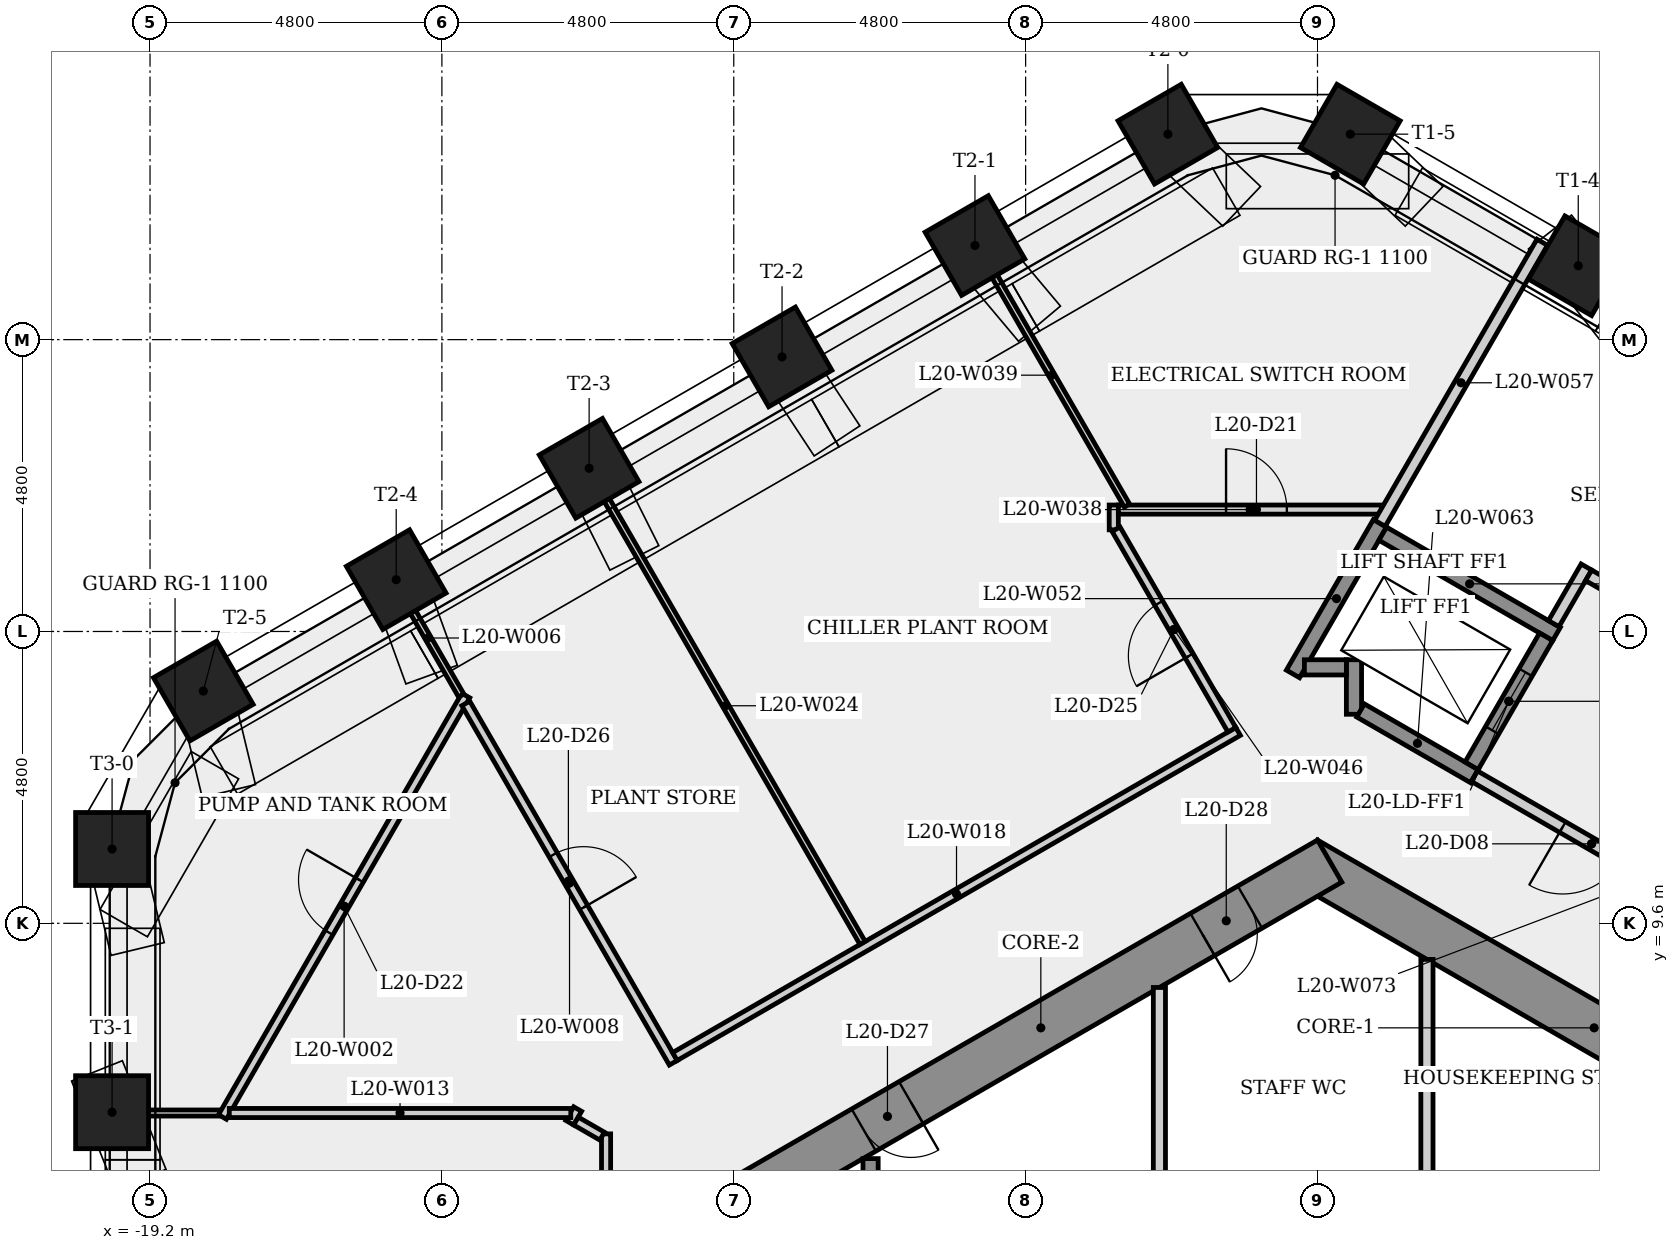
"""IFC4 building model, lengths in metres.
Left out: names, types, materials, properties, quantities, classifications, styles, units other than length and angle.
Written with IfcOpenShell. Run it as: python <this file> out.ifc"""

import sys

from ifc_helpers import new_model, si_unit, direction, frame, frame_2d, origin, origin_2d, place, context, subcontext, project, spatial, rectangle, extrude, element, fill, save


model = new_model("IFC4")
c1 = context("Model", 3, precision=1e-05, world=origin(), true_north=direction((0.0, 1.0)))
c2 = subcontext(c1, "Body", "Model", "MODEL_VIEW")
j1 = project(units=[si_unit("LENGTHUNIT", "METRE"), si_unit("PLANEANGLEUNIT", "RADIAN")], contexts=[c1])
p1 = place(None, origin())
s1 = spatial("IfcSite", under=j1, at=p1, CompositionType="ELEMENT")
p2 = place(p1, origin())
s2 = spatial("IfcBuilding", under=s1, at=p2, CompositionType="ELEMENT")
p3 = place(p2, frame((0.0, 0.0, 78.3)))
s3 = spatial("IfcBuildingStorey", under=s2, at=p3, CompositionType="ELEMENT", Elevation=78.3)
p4 = place(p3, frame((9.3, 5.138, 0.0), z_axis=(0.0, 0.0, 1.0), x_axis=(-0.866023993627, 0.500002442456, 0.0)))
e1 = element("IfcWall", 1, at=p4, inside=s3, PredefinedType="SHEAR", context=c2, shape_type="SweptSolid", body=[
    extrude(rectangle(XDim=10.97, YDim=0.8, at=frame_2d((5.485, 0.0))), origin(), (0.0, 0.0, 1.0), 4.8),
])
p5 = place(p4, frame((2.384, 0.0, 0.0)))
e2 = element("IfcOpeningElement", 2, at=p5, cuts=e1, PredefinedType="OPENING", context=c2, shape_type="SweptSolid", body=[
    extrude(rectangle(XDim=0.9, YDim=2.1, at=frame_2d((0.45, 1.05))), frame((0.0, 0.41, 0.0), z_axis=(0.0, -1.0, 0.0), x_axis=(1.0, 0.0, 0.0)), (0.0, 0.0, 1.0), 0.82),
])
p6 = place(p3, frame((0.2, 10.623, 0.0), z_axis=(0.0, 0.0, 1.0), x_axis=(-0.866023993627, -0.500002442456, 0.0)))
e3 = element("IfcWall", 3, at=p6, inside=s3, PredefinedType="SHEAR", context=c2, shape_type="SweptSolid", body=[
    extrude(rectangle(XDim=10.97, YDim=0.8, at=frame_2d((5.485, 0.0))), origin(), (0.0, 0.0, 1.0), 4.8),
])
p7 = place(p6, frame((7.947, 0.0, 0.0)))
e4 = element("IfcOpeningElement", 4, at=p7, cuts=e3, PredefinedType="OPENING", context=c2, shape_type="SweptSolid", body=[
    extrude(rectangle(XDim=0.9, YDim=2.1, at=frame_2d((0.45, 1.05))), frame((0.0, 0.41, 0.0), z_axis=(0.0, -1.0, 0.0), x_axis=(1.0, 0.0, 0.0)), (0.0, 0.0, 1.0), 0.82),
])
p8 = place(p6, frame((1.514, 0.0, 0.0)))
e5 = element("IfcOpeningElement", 5, at=p8, cuts=e3, PredefinedType="OPENING", context=c2, shape_type="SweptSolid", body=[
    extrude(rectangle(XDim=0.9, YDim=2.1, at=frame_2d((0.45, 1.05))), frame((0.0, 0.41, 0.0), z_axis=(0.0, -1.0, 0.0), x_axis=(1.0, 0.0, 0.0)), (0.0, 0.0, 1.0), 0.82),
])
for number, where, z_axis, x_axis in (
    (6, (4.289, 20.415, 0.0), (0.0, 0.0, 1.0), (0.5, 0.866, 0.0)),
    (7, (0.54, 22.579, 0.0), (0.0, 0.0, 1.0), (0.5, 0.866, 0.0)),
    (8, (-2.46, 22.579, 0.0), (0.0, 0.0, 1.0), (-0.5, 0.866, 0.0)),
    (9, (-5.633, 20.748, 0.0), (0.0, 0.0, 1.0), (-0.5, 0.866, 0.0)),
    (10, (-8.806, 18.916, 0.0), (0.0, 0.0, 1.0), (-0.5, 0.866, 0.0)),
    (11, (-11.979, 17.084, 0.0), (0.0, 0.0, 1.0), (-0.5, 0.866, 0.0)),
    (12, (-15.151, 15.252, 0.0), (0.0, 0.0, 1.0), (-0.5, 0.866, 0.0)),
    (13, (-18.324, 13.421, 0.0), (0.0, 0.0, 1.0), (-0.5, 0.866, 0.0)),
    (14, (-19.824, 10.823, 0.0), (0.0, 0.0, 1.0), (-1.0, 0.0, 0.0)),
    (15, (-19.824, 6.493, 0.0), (0.0, 0.0, 1.0), (-1.0, 0.0, 0.0)),
):
    element("IfcColumn", number, at=place(p3, frame(where, z_axis=z_axis, x_axis=x_axis)), inside=s3, PredefinedType="COLUMN", context=c2, shape_type="SweptSolid", body=[
        extrude(rectangle(XDim=1.2, YDim=1.2, at=origin_2d()), origin(), (0.0, 0.0, 1.0), 4.45),
    ])
p9 = place(p3, frame((-19.863, 6.48, 0.0), z_axis=(0.0, 0.0, 1.0), x_axis=(1.0, 0.0, 0.0)))
e16 = element("IfcWall", 16, at=p9, inside=s3, PredefinedType="PARTITIONING", context=c2, shape_type="SweptSolid", body=[
    extrude(rectangle(XDim=1.817, YDim=0.1, at=frame_2d((0.908, 0.0))), origin(), (0.0, 0.0, 1.0), 4.45),
])
p10 = place(p3, frame((-18.009, 6.415, 0.0), z_axis=(0.0, 0.0, 1.0), x_axis=(0.500010260686, 0.866019479694, 0.0)))
e17 = element("IfcWall", 17, at=p10, inside=s3, PredefinedType="PARTITIONING", context=c2, shape_type="SweptSolid", body=[
    extrude(rectangle(XDim=8.004, YDim=0.15, at=frame_2d((4.002, 0.0))), origin(), (0.0, 0.0, 1.0), 4.45),
])
p11 = place(p10, frame((3.502, 0.0, 0.0)))
e18 = element("IfcOpeningElement", 18, at=p11, cuts=e17, PredefinedType="OPENING", context=c2, shape_type="SweptSolid", body=[
    extrude(rectangle(XDim=1.0, YDim=2.1, at=frame_2d((0.5, 1.05))), frame((0.0, 0.085, 0.0), z_axis=(0.0, -1.0, 0.0), x_axis=(1.0, 0.0, 0.0)), (0.0, 0.0, 1.0), 0.17),
])
p12 = place(p3, frame((-15.175, 15.239, 0.0), z_axis=(0.0, 0.0, 1.0), x_axis=(0.500031897912, -0.866006986733, 0.0)))
e19 = element("IfcWall", 19, at=p12, inside=s3, PredefinedType="PARTITIONING", context=c2, shape_type="SweptSolid", body=[
    extrude(rectangle(XDim=2.185, YDim=0.1, at=frame_2d((1.093, 0.0))), origin(), (0.0, 0.0, 1.0), 2.425),
])
p13 = place(p3, frame((-14.007, 13.217, 0.0), z_axis=(0.0, 0.0, 1.0), x_axis=(0.499986710104, -0.866033076574, 0.0)))
e20 = element("IfcWall", 20, at=p13, inside=s3, PredefinedType="PARTITIONING", context=c2, shape_type="SweptSolid", body=[
    extrude(rectangle(XDim=6.824, YDim=0.15, at=frame_2d((3.412, 0.0))), origin(), (0.0, 0.0, 1.0), 4.45),
])
p14 = place(p13, frame((2.875, 0.0, 0.0)))
e21 = element("IfcOpeningElement", 21, at=p14, cuts=e20, PredefinedType="OPENING", context=c2, shape_type="SweptSolid", body=[
    extrude(rectangle(XDim=1.0, YDim=2.1, at=frame_2d((0.5, 1.05))), frame((0.0, 0.085, 0.0), z_axis=(0.0, -1.0, 0.0), x_axis=(1.0, 0.0, 0.0)), (0.0, 0.0, 1.0), 0.17),
])
p15 = place(p3, frame((-12.297, 6.32, 0.0), z_axis=(0.0, 0.0, 1.0), x_axis=(0.499885440202, 0.866091534813, 0.0)))
e22 = element("IfcWall", 22, at=p15, inside=s3, PredefinedType="PARTITIONING", context=c2, shape_type="SweptSolid", body=[
    extrude(rectangle(XDim=0.259, YDim=0.15, at=frame_2d((0.13, 0.0))), origin(), (0.0, 0.0, 1.0), 4.45),
])
p16 = place(p3, frame((-12.28, 6.48, 0.0), z_axis=(0.0, 0.0, 1.0), x_axis=(-1.0, 0.0, 0.0)))
e23 = element("IfcWall", 23, at=p16, inside=s3, PredefinedType="PARTITIONING", context=c2, shape_type="SweptSolid", body=[
    extrude(rectangle(XDim=5.616, YDim=0.15, at=frame_2d((2.808, 0.0))), origin(), (0.0, 0.0, 1.0), 4.45),
])
p17 = place(p3, frame((-11.7, -5.987, 0.0), z_axis=(0.0, 0.0, 1.0), x_axis=(0.0, 1.0, 0.0)))
e24 = element("IfcWall", 24, at=p17, inside=s3, PredefinedType="PARTITIONING", context=c2, shape_type="SweptSolid", body=[
    extrude(rectangle(XDim=12.125, YDim=0.15, at=frame_2d((6.062, 0.0))), origin(), (0.0, 0.0, 1.0), 4.45),
])
p18 = place(p17, frame((5.225, 0.0, 0.0)))
e25 = element("IfcOpeningElement", 25, at=p18, cuts=e24, PredefinedType="OPENING", context=c2, shape_type="SweptSolid", body=[
    extrude(rectangle(XDim=1.6, YDim=2.1, at=frame_2d((0.8, 1.05))), frame((0.0, 0.085, 0.0), z_axis=(0.0, -1.0, 0.0), x_axis=(1.0, 0.0, 0.0)), (0.0, 0.0, 1.0), 0.17),
])
p19 = place(p3, frame((-11.765, 6.1, 0.0), z_axis=(0.0, 0.0, 1.0), x_axis=(-0.865964461276, 0.500105540669, 0.0)))
e26 = element("IfcWall", 26, at=p19, inside=s3, PredefinedType="PARTITIONING", context=c2, shape_type="SweptSolid", body=[
    extrude(rectangle(XDim=0.497, YDim=0.15, at=frame_2d((0.248, 0.0))), origin(), (0.0, 0.0, 1.0), 4.45),
])
p20 = place(p3, frame((-10.567, 7.409, 0.0), z_axis=(0.0, 0.0, 1.0), x_axis=(0.866023253344, 0.500003724654, 0.0)))
e27 = element("IfcWall", 27, at=p20, inside=s3, PredefinedType="PARTITIONING", context=c2, shape_type="SweptSolid", body=[
    extrude(rectangle(XDim=10.694, YDim=0.15, at=frame_2d((5.347, 0.0))), origin(), (0.0, 0.0, 1.0), 4.45),
])
p21 = place(p3, frame((-7.482, 9.277, 0.0), z_axis=(0.0, 0.0, 1.0), x_axis=(-0.499989081013, 0.866031707772, 0.0)))
e28 = element("IfcWall", 28, at=p21, inside=s3, PredefinedType="PARTITIONING", context=c2, shape_type="SweptSolid", body=[
    extrude(rectangle(XDim=9.01, YDim=0.1, at=frame_2d((4.505, 0.0))), origin(), (0.0, 0.0, 1.0), 2.425),
])
p22 = place(p3, frame((-7.35, 1.925, 0.0), z_axis=(0.0, 0.0, 1.0), x_axis=(0.0, 1.0, 0.0)))
e29 = element("IfcWall", 29, at=p22, inside=s3, PredefinedType="SHEAR", context=c2, shape_type="SweptSolid", body=[
    extrude(rectangle(XDim=3.805, YDim=0.25, at=frame_2d((1.903, 0.0))), origin(), (0.0, 0.0, 1.0), 4.45),
])
p23 = place(p3, frame((-3.35, 16.072, 0.0), z_axis=(0.0, 0.0, 1.0), x_axis=(0.0, 1.0, 0.0)))
e30 = element("IfcWall", 30, at=p23, inside=s3, PredefinedType="PARTITIONING", context=c2, shape_type="SweptSolid", body=[
    extrude(rectangle(XDim=0.408, YDim=0.15, at=frame_2d((0.204, 0.0))), origin(), (0.0, 0.0, 1.0), 4.45),
])
p24 = place(p3, frame((-3.275, 16.405, 0.0), z_axis=(0.0, 0.0, 1.0), x_axis=(1.0, 0.0, 0.0)))
e31 = element("IfcWall", 31, at=p24, inside=s3, PredefinedType="PARTITIONING", context=c2, shape_type="SweptSolid", body=[
    extrude(rectangle(XDim=4.333, YDim=0.15, at=frame_2d((2.166, 0.0))), origin(), (0.0, 0.0, 1.0), 4.45),
])
p25 = place(p24, frame((1.771, 0.0, 0.0)))
e32 = element("IfcOpeningElement", 32, at=p25, cuts=e31, PredefinedType="OPENING", context=c2, shape_type="SweptSolid", body=[
    extrude(rectangle(XDim=1.0, YDim=2.1, at=frame_2d((0.5, 1.05))), frame((0.0, 0.085, 0.0), z_axis=(0.0, -1.0, 0.0), x_axis=(1.0, 0.0, 0.0)), (0.0, 0.0, 1.0), 0.17),
])
p26 = place(p3, frame((-3.132, 16.47, 0.0), z_axis=(0.0, 0.0, 1.0), x_axis=(-0.499996833818, 0.866027231772, 0.0)))
e33 = element("IfcWall", 33, at=p26, inside=s3, PredefinedType="PARTITIONING", context=c2, shape_type="SweptSolid", body=[
    extrude(rectangle(XDim=4.955, YDim=0.1, at=frame_2d((2.478, 0.0))), origin(), (0.0, 0.0, 1.0), 2.425),
])
p27 = place(p3, frame((-2.6, 8.545, 0.0), z_axis=(0.0, 0.0, 1.0), x_axis=(0.0, -1.0, 0.0)))
e34 = element("IfcWall", 34, at=p27, inside=s3, PredefinedType="PARTITIONING", context=c2, shape_type="SweptSolid", body=[
    extrude(rectangle(XDim=3.27, YDim=0.2, at=frame_2d((1.635, 0.0))), origin(), (0.0, 0.0, 1.0), 4.45),
])
p28 = place(p3, frame((-1.408, 12.784, 0.0), z_axis=(0.0, 0.0, 1.0), x_axis=(-0.500027655771, 0.866009436129, 0.0)))
e35 = element("IfcWall", 35, at=p28, inside=s3, PredefinedType="PARTITIONING", context=c2, shape_type="SweptSolid", body=[
    extrude(rectangle(XDim=3.808, YDim=0.15, at=frame_2d((1.904, 0.0))), origin(), (0.0, 0.0, 1.0), 4.45),
])
p29 = place(p28, frame((1.404, 0.0, 0.0)))
e36 = element("IfcOpeningElement", 36, at=p29, cuts=e35, PredefinedType="OPENING", context=c2, shape_type="SweptSolid", body=[
    extrude(rectangle(XDim=1.0, YDim=2.1, at=frame_2d((0.5, 1.05))), frame((0.0, 0.085, 0.0), z_axis=(0.0, -1.0, 0.0), x_axis=(1.0, 0.0, 0.0)), (0.0, 0.0, 1.0), 0.17),
])
p30 = place(p3, frame((-0.403, 13.702, 0.0), z_axis=(0.0, 0.0, 1.0), x_axis=(0.499976111731, 0.866039195244, 0.0)))
e37 = element("IfcWall", 37, at=p30, inside=s3, PredefinedType="SHEAR", context=c2, shape_type="SweptSolid", body=[
    extrude(rectangle(XDim=2.861, YDim=0.25, at=frame_2d((1.43, 0.0))), origin(), (0.0, 0.0, 1.0), 4.45),
])
p31 = place(p3, frame((0.6, 13.039, 0.0), z_axis=(0.0, 0.0, 1.0), x_axis=(0.0, 1.0, 0.0)))
e38 = element("IfcWall", 38, at=p31, inside=s3, PredefinedType="SHEAR", context=c2, shape_type="SweptSolid", body=[
    extrude(rectangle(XDim=0.896, YDim=0.25, at=frame_2d((0.448, 0.0))), origin(), (0.0, 0.0, 1.0), 4.45),
])
p32 = place(p3, frame((0.475, 13.81, 0.0), z_axis=(0.0, 0.0, 1.0), x_axis=(-1.0, 0.0, 0.0)))
e39 = element("IfcWall", 39, at=p32, inside=s3, PredefinedType="SHEAR", context=c2, shape_type="SweptSolid", body=[
    extrude(rectangle(XDim=0.691, YDim=0.25, at=frame_2d((0.345, 0.0))), origin(), (0.0, 0.0, 1.0), 4.8),
])
p33 = place(p3, frame((1.027, 16.179, 0.0), z_axis=(0.0, 0.0, 1.0), x_axis=(0.499995631649, 0.866027925839, 0.0)))
e40 = element("IfcWall", 40, at=p33, inside=s3, PredefinedType="PLUMBINGWALL", context=c2, shape_type="SweptSolid", body=[
    extrude(rectangle(XDim=5.338, YDim=0.2, at=frame_2d((2.669, 0.0))), origin(), (0.0, 0.0, 1.0), 4.45),
])
p34 = place(p3, frame((1.073, 16.008, 0.0), z_axis=(0.0, 0.0, 1.0), x_axis=(0.866040211805, -0.499974350878, 0.0)))
e41 = element("IfcWall", 41, at=p34, inside=s3, PredefinedType="SHEAR", context=c2, shape_type="SweptSolid", body=[
    extrude(rectangle(XDim=3.3, YDim=0.25, at=frame_2d((1.65, 0.0))), origin(), (0.0, 0.0, 1.0), 4.45),
])
p35 = place(p3, frame((1.8, 9.007, 0.0), z_axis=(0.0, 0.0, 1.0), x_axis=(0.0, -1.0, 0.0)))
e42 = element("IfcWall", 42, at=p35, inside=s3, PredefinedType="PARTITIONING", context=c2, shape_type="SweptSolid", body=[
    extrude(rectangle(XDim=3.732, YDim=0.2, at=frame_2d((1.866, 0.0))), origin(), (0.0, 0.0, 1.0), 4.45),
])
p36 = place(p3, frame((2.581, 12.02, 0.0), z_axis=(0.0, 0.0, 1.0), x_axis=(-0.86603892542, 0.499976579108, 0.0)))
e43 = element("IfcWall", 43, at=p36, inside=s3, PredefinedType="SHEAR", context=c2, shape_type="SweptSolid", body=[
    extrude(rectangle(XDim=2.162, YDim=0.25, at=frame_2d((1.081, 0.0))), origin(), (0.0, 0.0, 1.0), 4.45),
])
p37 = place(p3, frame((2.535, 12.191, 0.0), z_axis=(0.0, 0.0, 1.0), x_axis=(0.500061746146, 0.865989751695, 0.0)))
e44 = element("IfcWall", 44, at=p37, inside=s3, PredefinedType="SHEAR", context=c2, shape_type="SweptSolid", body=[
    extrude(rectangle(XDim=2.45, YDim=0.25, at=frame_2d((1.225, 0.0))), origin(), (0.0, 0.0, 1.0), 4.8),
])
p38 = place(p37, frame((0.675, 0.0, 0.0)))
e45 = element("IfcOpeningElement", 45, at=p38, cuts=e44, PredefinedType="OPENING", context=c2, shape_type="SweptSolid", body=[
    extrude(rectangle(XDim=1.1, YDim=2.1, at=frame_2d((0.55, 1.05))), frame((0.0, 0.135, 0.0), z_axis=(0.0, -1.0, 0.0), x_axis=(1.0, 0.0, 0.0)), (0.0, 0.0, 1.0), 0.27),
])
p39 = place(p3, frame((3.885, 14.529, 0.0), z_axis=(0.0, 0.0, 1.0), x_axis=(0.499997628298, 0.866026773083, 0.0)))
e46 = element("IfcWall", 46, at=p39, inside=s3, PredefinedType="PLUMBINGWALL", context=c2, shape_type="SweptSolid", body=[
    extrude(rectangle(XDim=1.075, YDim=0.2, at=frame_2d((0.538, 0.0))), origin(), (0.0, 0.0, 1.0), 4.45),
])
p40 = place(p3, frame((4.459, 15.323, 0.0), z_axis=(0.0, 0.0, 1.0), x_axis=(0.866016039709, -0.500016218704, 0.0)))
e47 = element("IfcWall", 47, at=p40, inside=s3, PredefinedType="PLUMBINGWALL", context=c2, shape_type="SweptSolid", body=[
    extrude(rectangle(XDim=4.7, YDim=0.2, at=frame_2d((2.35, 0.0))), origin(), (0.0, 0.0, 1.0), 4.45),
])
p41 = place(p3, frame((6.435, 9.795, 0.0), z_axis=(0.0, 0.0, 1.0), x_axis=(-0.866012907634, 0.500021643343, 0.0)))
e48 = element("IfcWall", 48, at=p41, inside=s3, PredefinedType="PARTITIONING", context=c2, shape_type="SweptSolid", body=[
    extrude(rectangle(XDim=4.45, YDim=0.2, at=frame_2d((2.225, 0.0))), origin(), (0.0, 0.0, 1.0), 4.45),
])
p42 = place(p41, frame((1.675, 0.0, 0.0)))
e49 = element("IfcOpeningElement", 49, at=p42, cuts=e48, PredefinedType="OPENING", context=c2, shape_type="SweptSolid", body=[
    extrude(rectangle(XDim=1.1, YDim=2.1, at=frame_2d((0.55, 1.05))), frame((0.0, 0.11, 0.0), z_axis=(0.0, -1.0, 0.0), x_axis=(1.0, 0.0, 0.0)), (0.0, 0.0, 1.0), 0.22),
])
p43 = place(p42, origin())
e50 = element("IfcDoor", 50, at=p43, inside=s3, OperationType="SINGLE_SWING_RIGHT", PredefinedType="DOOR", context=c2, shape_type="SweptSolid", body=[
    extrude(rectangle(XDim=1.1, YDim=2.1, at=frame_2d((0.55, 1.05))), frame((0.0, 0.025, 0.0), z_axis=(0.0, -1.0, 0.0), x_axis=(1.0, 0.0, 0.0)), (0.0, 0.0, 1.0), 0.05),
])
fill(e49, e50)
p44 = place(p38, origin())
e51 = element("IfcDoor", 51, at=p44, inside=s3, OperationType="SLIDING_TO_LEFT", PredefinedType="DOOR", context=c2, shape_type="SweptSolid", body=[
    extrude(rectangle(XDim=1.1, YDim=2.1, at=frame_2d((0.55, 1.05))), frame((0.0, 0.025, 0.0), z_axis=(0.0, -1.0, 0.0), x_axis=(1.0, 0.0, 0.0)), (0.0, 0.0, 1.0), 0.05),
])
fill(e45, e51)
p45 = place(p25, origin())
e52 = element("IfcDoor", 52, at=p45, inside=s3, OperationType="SINGLE_SWING_LEFT", PredefinedType="DOOR", context=c2, shape_type="SweptSolid", body=[
    extrude(rectangle(XDim=1.0, YDim=2.1, at=frame_2d((0.5, 1.05))), frame((0.0, 0.025, 0.0), z_axis=(0.0, -1.0, 0.0), x_axis=(1.0, 0.0, 0.0)), (0.0, 0.0, 1.0), 0.05),
])
fill(e32, e52)
p46 = place(p11, origin())
e53 = element("IfcDoor", 53, at=p46, inside=s3, OperationType="SINGLE_SWING_RIGHT", PredefinedType="DOOR", context=c2, shape_type="SweptSolid", body=[
    extrude(rectangle(XDim=1.0, YDim=2.1, at=frame_2d((0.5, 1.05))), frame((0.0, 0.025, 0.0), z_axis=(0.0, -1.0, 0.0), x_axis=(1.0, 0.0, 0.0)), (0.0, 0.0, 1.0), 0.05),
])
fill(e18, e53)
p47 = place(p29, origin())
e54 = element("IfcDoor", 54, at=p47, inside=s3, OperationType="SINGLE_SWING_LEFT", PredefinedType="DOOR", context=c2, shape_type="SweptSolid", body=[
    extrude(rectangle(XDim=1.0, YDim=2.1, at=frame_2d((0.5, 1.05))), frame((0.0, 0.025, 0.0), z_axis=(0.0, -1.0, 0.0), x_axis=(1.0, 0.0, 0.0)), (0.0, 0.0, 1.0), 0.05),
])
fill(e36, e54)
p48 = place(p14, origin())
e55 = element("IfcDoor", 55, at=p48, inside=s3, OperationType="SINGLE_SWING_RIGHT", PredefinedType="DOOR", context=c2, shape_type="SweptSolid", body=[
    extrude(rectangle(XDim=1.0, YDim=2.1, at=frame_2d((0.5, 1.05))), frame((0.0, 0.025, 0.0), z_axis=(0.0, -1.0, 0.0), x_axis=(1.0, 0.0, 0.0)), (0.0, 0.0, 1.0), 0.05),
])
fill(e21, e55)
p49 = place(p7, origin())
e56 = element("IfcDoor", 56, at=p49, inside=s3, OperationType="SINGLE_SWING_LEFT", PredefinedType="DOOR", context=c2, shape_type="SweptSolid", body=[
    extrude(rectangle(XDim=0.9, YDim=2.1, at=frame_2d((0.45, 1.05))), frame((0.0, 0.025, 0.0), z_axis=(0.0, -1.0, 0.0), x_axis=(1.0, 0.0, 0.0)), (0.0, 0.0, 1.0), 0.05),
])
fill(e4, e56)
p50 = place(p8, origin())
e57 = element("IfcDoor", 57, at=p50, inside=s3, OperationType="SINGLE_SWING_RIGHT", PredefinedType="DOOR", context=c2, shape_type="SweptSolid", body=[
    extrude(rectangle(XDim=0.9, YDim=2.1, at=frame_2d((0.45, 1.05))), frame((0.0, 0.025, 0.0), z_axis=(0.0, -1.0, 0.0), x_axis=(1.0, 0.0, 0.0)), (0.0, 0.0, 1.0), 0.05),
])
fill(e5, e57)
save(model, sys.argv[1])
